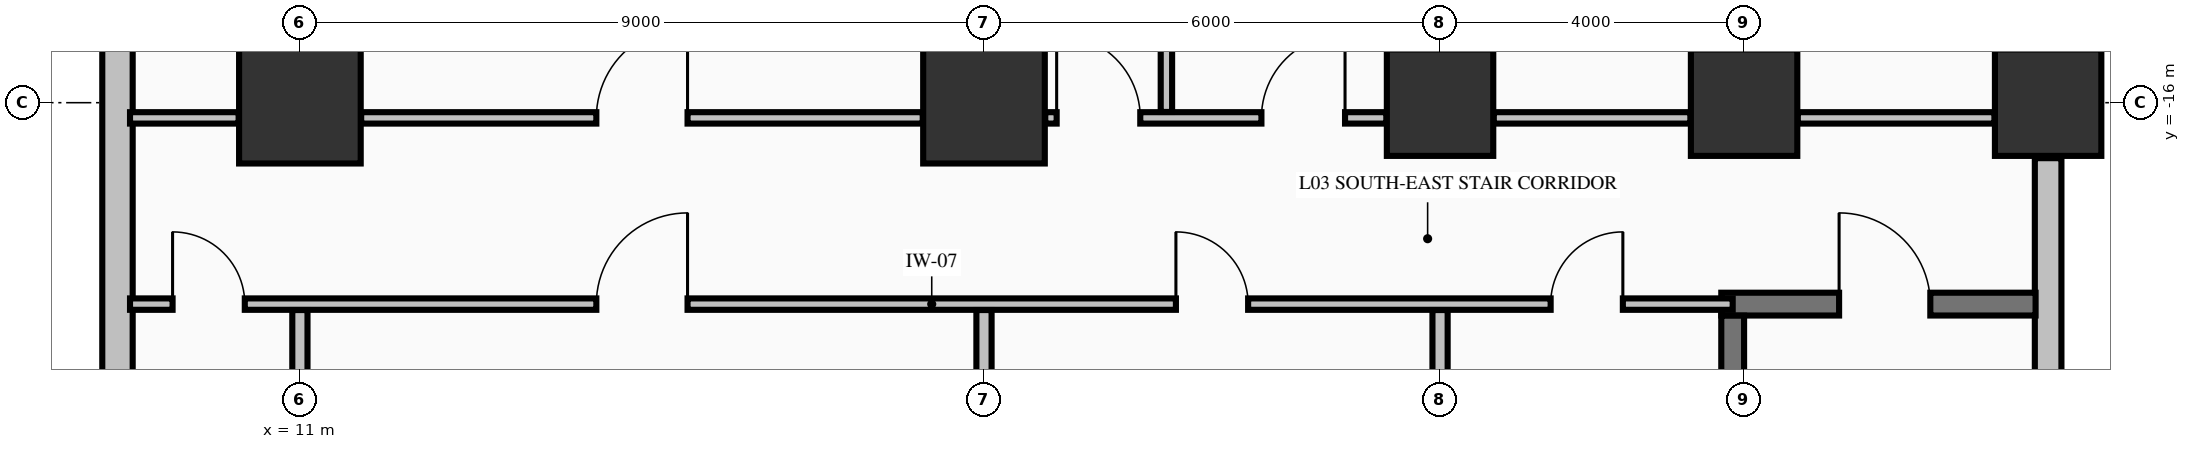
"""IFC4 building model, lengths in metres.
Left out: names, types, materials, properties, quantities, classifications, styles, units other than length and angle.
Written with IfcOpenShell. Run it as: python <this file> out.ifc"""

import sys

from ifc_helpers import new_model, si_unit, direction, frame, frame_2d, origin, origin_2d, place, context, subcontext, project, spatial, rectangle, extrude, element, fill, save


model = new_model("IFC4")
c1 = context("Model", 3, precision=1e-05, world=origin(), true_north=direction((0.0, 1.0)))
c2 = subcontext(c1, "Body", "Model", "MODEL_VIEW")
j1 = project(units=[si_unit("LENGTHUNIT", "METRE"), si_unit("PLANEANGLEUNIT", "RADIAN")], contexts=[c1])
p1 = place(None, origin())
s1 = spatial("IfcSite", under=j1, at=p1, CompositionType="ELEMENT")
p2 = place(p1, origin())
s2 = spatial("IfcBuilding", under=s1, at=p2, CompositionType="ELEMENT")
p3 = place(p2, frame((0.0, 0.0, 16.32)))
s3 = spatial("IfcBuildingStorey", under=s2, at=p3, CompositionType="ELEMENT", Elevation=16.32)
for number, where, z_axis, x_axis in (
    (1, (11.0, -16.0, 0.0), (0.0, 0.0, 1.0), (1.0, 0.0, 0.0)),
    (2, (20.0, -16.0, 0.0), (0.0, 0.0, 1.0), (1.0, 0.0, 0.0)),
):
    element("IfcColumn", number, at=place(p3, frame(where, z_axis=z_axis, x_axis=x_axis)), inside=s3, PredefinedType="COLUMN", context=c2, shape_type="SweptSolid", body=[
        extrude(rectangle(XDim=1.6, YDim=1.6, at=origin_2d()), origin(), (0.0, 0.0, 1.0), 4.99),
    ])
for number, where, z_axis, x_axis in (
    (3, (26.0, -16.0, 0.0), (0.0, 0.0, 1.0), (1.0, 0.0, 0.0)),
    (4, (30.0, -16.0, 0.0), (0.0, 0.0, 1.0), (1.0, 0.0, 0.0)),
    (5, (34.0, -16.0, 0.0), (0.0, 0.0, 1.0), (1.0, 0.0, 0.0)),
):
    element("IfcColumn", number, at=place(p3, frame(where, z_axis=z_axis, x_axis=x_axis)), inside=s3, PredefinedType="COLUMN", context=c2, shape_type="SweptSolid", body=[
        extrude(rectangle(XDim=1.4, YDim=1.4, at=origin_2d()), origin(), (0.0, 0.0, 1.0), 4.99),
    ])
p4 = place(p3, frame((34.0, -16.73, 0.0), z_axis=(0.0, 0.0, 1.0), x_axis=(0.0, -1.0, 0.0)))
e6 = element("IfcWall", 6, at=p4, inside=s3, PredefinedType="STANDARD", context=c2, shape_type="SweptSolid", body=[
    extrude(rectangle(XDim=4.54, YDim=0.35, at=frame_2d((2.27, 0.0))), origin(), (0.0, 0.0, 1.0), 4.99),
])
p5 = place(p3, frame((8.6, -0.65, 0.0), z_axis=(0.0, 0.0, 1.0), x_axis=(0.0, -1.0, 0.0)))
e7 = element("IfcWall", 7, at=p5, inside=s3, PredefinedType="STANDARD", context=c2, shape_type="SweptSolid", body=[
    extrude(rectangle(XDim=24.72, YDim=0.4, at=frame_2d((12.36, 0.0))), origin(), (0.0, 0.0, 1.0), 2.582),
])
p6 = place(p3, frame((29.7, -18.65, 0.0), z_axis=(0.0, 0.0, 1.0), x_axis=(1.0, 0.0, 0.0)))
e8 = element("IfcWall", 8, at=p6, inside=s3, PredefinedType="SHEAR", context=c2, shape_type="SweptSolid", body=[
    extrude(rectangle(XDim=4.135, YDim=0.3, at=frame_2d((2.067, 0.0))), origin(), (0.0, 0.0, 1.0), 4.99),
])
p7 = place(p6, frame((1.55, 0.0, 0.0)))
e9 = element("IfcOpeningElement", 9, at=p7, cuts=e8, PredefinedType="OPENING", context=c2, shape_type="SweptSolid", body=[
    extrude(rectangle(XDim=1.2, YDim=2.15, at=frame_2d((0.6, 1.075))), frame((0.0, 0.16, 0.0), z_axis=(0.0, -1.0, 0.0), x_axis=(1.0, 0.0, 0.0)), (0.0, 0.0, 1.0), 0.32),
])
p8 = place(p3, frame((8.765, -18.65, 0.0), z_axis=(0.0, 0.0, 1.0), x_axis=(1.0, 0.0, 0.0)))
e10 = element("IfcWall", 10, at=p8, inside=s3, PredefinedType="PARTITIONING", context=c2, shape_type="SweptSolid", body=[
    extrude(rectangle(XDim=21.085, YDim=0.15, at=frame_2d((10.542, 0.0))), origin(), (0.0, 0.0, 1.0), 4.99),
])
p9 = place(p8, frame((0.56, 0.0, 0.0)))
e11 = element("IfcOpeningElement", 11, at=p9, cuts=e10, PredefinedType="OPENING", context=c2, shape_type="SweptSolid", body=[
    extrude(rectangle(XDim=0.95, YDim=2.15, at=frame_2d((0.475, 1.075))), frame((0.0, 0.085, 0.0), z_axis=(0.0, -1.0, 0.0), x_axis=(1.0, 0.0, 0.0)), (0.0, 0.0, 1.0), 0.17),
])
p10 = place(p8, frame((6.135, 0.0, 0.0)))
e12 = element("IfcOpeningElement", 12, at=p10, cuts=e10, PredefinedType="OPENING", context=c2, shape_type="SweptSolid", body=[
    extrude(rectangle(XDim=1.2, YDim=2.15, at=frame_2d((0.6, 1.075))), frame((0.0, 0.085, 0.0), z_axis=(0.0, -1.0, 0.0), x_axis=(1.0, 0.0, 0.0)), (0.0, 0.0, 1.0), 0.17),
])
p11 = place(p8, frame((13.76, 0.0, 0.0)))
e13 = element("IfcOpeningElement", 13, at=p11, cuts=e10, PredefinedType="OPENING", context=c2, shape_type="SweptSolid", body=[
    extrude(rectangle(XDim=0.95, YDim=2.15, at=frame_2d((0.475, 1.075))), frame((0.0, 0.085, 0.0), z_axis=(0.0, -1.0, 0.0), x_axis=(1.0, 0.0, 0.0)), (0.0, 0.0, 1.0), 0.17),
])
p12 = place(p8, frame((18.69, 0.0, 0.0)))
e14 = element("IfcOpeningElement", 14, at=p12, cuts=e10, PredefinedType="OPENING", context=c2, shape_type="SweptSolid", body=[
    extrude(rectangle(XDim=0.95, YDim=2.15, at=frame_2d((0.475, 1.075))), frame((0.0, 0.085, 0.0), z_axis=(0.0, -1.0, 0.0), x_axis=(1.0, 0.0, 0.0)), (0.0, 0.0, 1.0), 0.17),
])
p13 = place(p3, frame((8.765, -16.2, 0.0), z_axis=(0.0, 0.0, 1.0), x_axis=(1.0, 0.0, 0.0)))
e15 = element("IfcWall", 15, at=p13, inside=s3, PredefinedType="PARTITIONING", context=c2, shape_type="SweptSolid", body=[
    extrude(rectangle(XDim=1.429, YDim=0.15, at=frame_2d((0.715, 0.0))), origin(), (0.0, 0.0, 1.0), 4.99),
])
p14 = place(p3, frame((11.806, -16.2, 0.0), z_axis=(0.0, 0.0, 1.0), x_axis=(1.0, 0.0, 0.0)))
e16 = element("IfcWall", 16, at=p14, inside=s3, PredefinedType="PARTITIONING", context=c2, shape_type="SweptSolid", body=[
    extrude(rectangle(XDim=7.388, YDim=0.15, at=frame_2d((3.694, 0.0))), origin(), (0.0, 0.0, 1.0), 3.332),
])
p15 = place(p14, frame((3.094, 0.0, 0.0)))
e17 = element("IfcOpeningElement", 17, at=p15, cuts=e16, PredefinedType="OPENING", context=c2, shape_type="SweptSolid", body=[
    extrude(rectangle(XDim=1.2, YDim=2.15, at=frame_2d((0.6, 1.075))), frame((0.0, 0.085, 0.0), z_axis=(0.0, -1.0, 0.0), x_axis=(1.0, 0.0, 0.0)), (0.0, 0.0, 1.0), 0.17),
])
p16 = place(p3, frame((20.806, -16.2, 0.0), z_axis=(0.0, 0.0, 1.0), x_axis=(1.0, 0.0, 0.0)))
e18 = element("IfcWall", 18, at=p16, inside=s3, PredefinedType="PARTITIONING", context=c2, shape_type="SweptSolid", body=[
    extrude(rectangle(XDim=4.488, YDim=0.15, at=frame_2d((2.244, 0.0))), origin(), (0.0, 0.0, 1.0), 3.332),
])
p17 = place(p16, frame((0.15, 0.0, 0.0)))
e19 = element("IfcOpeningElement", 19, at=p17, cuts=e18, PredefinedType="OPENING", context=c2, shape_type="SweptSolid", body=[
    extrude(rectangle(XDim=1.1, YDim=2.15, at=frame_2d((0.55, 1.075))), frame((0.0, 0.085, 0.0), z_axis=(0.0, -1.0, 0.0), x_axis=(1.0, 0.0, 0.0)), (0.0, 0.0, 1.0), 0.17),
])
p18 = place(p16, frame((2.844, 0.0, 0.0)))
e20 = element("IfcOpeningElement", 20, at=p18, cuts=e18, PredefinedType="OPENING", context=c2, shape_type="SweptSolid", body=[
    extrude(rectangle(XDim=1.1, YDim=2.15, at=frame_2d((0.55, 1.075))), frame((0.0, 0.085, 0.0), z_axis=(0.0, -1.0, 0.0), x_axis=(1.0, 0.0, 0.0)), (0.0, 0.0, 1.0), 0.17),
])
for number, where, z_axis, x_axis in (
    (21, (26.706, -16.2, 0.0), (0.0, 0.0, 1.0), (1.0, 0.0, 0.0)),
    (22, (30.706, -16.2, 0.0), (0.0, 0.0, 1.0), (1.0, 0.0, 0.0)),
):
    element("IfcWall", number, at=place(p3, frame(where, z_axis=z_axis, x_axis=x_axis)), inside=s3, PredefinedType="PARTITIONING", context=c2, shape_type="SweptSolid", body=[
        extrude(rectangle(XDim=2.588, YDim=0.15, at=frame_2d((1.294, 0.0))), origin(), (0.0, 0.0, 1.0), 3.332),
    ])
p19 = place(p3, frame((29.85, -28.296, 0.0), z_axis=(0.0, 0.0, 1.0), x_axis=(0.0, 1.0, 0.0)))
e23 = element("IfcWall", 23, at=p19, inside=s3, PredefinedType="SHEAR", context=c2, shape_type="SweptSolid", body=[
    extrude(rectangle(XDim=9.494, YDim=0.3, at=frame_2d((4.747, 0.0))), origin(), (0.0, 0.0, 1.0), 4.99),
])
for number, where, z_axis, x_axis in (
    (24, (11.0, -21.194, 0.0), (0.0, 0.0, 1.0), (0.0, 1.0, 0.0)),
    (25, (20.0, -21.194, 0.0), (0.0, 0.0, 1.0), (0.0, 1.0, 0.0)),
):
    element("IfcWall", number, at=place(p3, frame(where, z_axis=z_axis, x_axis=x_axis)), inside=s3, PredefinedType="PARTITIONING", context=c2, shape_type="SweptSolid", body=[
        extrude(rectangle(XDim=2.466, YDim=0.2, at=frame_2d((1.233, 0.0))), origin(), (0.0, 0.0, 1.0), 3.332),
    ])
p20 = place(p3, frame((22.4, -16.122, 0.0), z_axis=(0.0, 0.0, 1.0), x_axis=(0.0, 1.0, 0.0)))
e26 = element("IfcWall", 26, at=p20, inside=s3, PredefinedType="PARTITIONING", context=c2, shape_type="SweptSolid", body=[
    extrude(rectangle(XDim=32.044, YDim=0.15, at=frame_2d((16.022, 0.0))), origin(), (0.0, 0.0, 1.0), 4.99),
])
p21 = place(p20, frame((10.522, 0.0, 0.0)))
e27 = element("IfcOpeningElement", 27, at=p21, cuts=e26, PredefinedType="OPENING", context=c2, shape_type="SweptSolid", body=[
    extrude(rectangle(XDim=1.2, YDim=2.15, at=frame_2d((0.6, 1.075))), frame((0.0, 0.085, 0.0), z_axis=(0.0, -1.0, 0.0), x_axis=(1.0, 0.0, 0.0)), (0.0, 0.0, 1.0), 0.17),
])
p22 = place(p20, frame((20.522, 0.0, 0.0)))
e28 = element("IfcOpeningElement", 28, at=p22, cuts=e26, PredefinedType="OPENING", context=c2, shape_type="SweptSolid", body=[
    extrude(rectangle(XDim=1.2, YDim=2.15, at=frame_2d((0.6, 1.075))), frame((0.0, 0.085, 0.0), z_axis=(0.0, -1.0, 0.0), x_axis=(1.0, 0.0, 0.0)), (0.0, 0.0, 1.0), 0.17),
])
p23 = place(p3, frame((26.0, -21.294, 0.0), z_axis=(0.0, 0.0, 1.0), x_axis=(0.0, 1.0, 0.0)))
e29 = element("IfcWall", 29, at=p23, inside=s3, PredefinedType="PARTITIONING", context=c2, shape_type="SweptSolid", body=[
    extrude(rectangle(XDim=2.566, YDim=0.2, at=frame_2d((1.283, 0.0))), origin(), (0.0, 0.0, 1.0), 3.332),
])
p24 = place(p7, origin())
e30 = element("IfcDoor", 30, at=p24, inside=s3, OperationType="SINGLE_SWING_LEFT", PredefinedType="DOOR", context=c2, shape_type="SweptSolid", body=[
    extrude(rectangle(XDim=1.2, YDim=2.15, at=frame_2d((0.6, 1.075))), frame((0.0, 0.025, 0.0), z_axis=(0.0, -1.0, 0.0), x_axis=(1.0, 0.0, 0.0)), (0.0, 0.0, 1.0), 0.05),
])
fill(e9, e30)
p25 = place(p15, origin())
e31 = element("IfcDoor", 31, at=p25, inside=s3, OperationType="SINGLE_SWING_RIGHT", PredefinedType="DOOR", context=c2, shape_type="SweptSolid", body=[
    extrude(rectangle(XDim=1.2, YDim=2.15, at=frame_2d((0.6, 1.075))), frame((0.0, 0.025, 0.0), z_axis=(0.0, -1.0, 0.0), x_axis=(1.0, 0.0, 0.0)), (0.0, 0.0, 1.0), 0.05),
])
fill(e17, e31)
p26 = place(p17, origin())
e32 = element("IfcDoor", 32, at=p26, inside=s3, OperationType="SINGLE_SWING_LEFT", PredefinedType="DOOR", context=c2, shape_type="SweptSolid", body=[
    extrude(rectangle(XDim=1.1, YDim=2.15, at=frame_2d((0.55, 1.075))), frame((0.0, 0.025, 0.0), z_axis=(0.0, -1.0, 0.0), x_axis=(1.0, 0.0, 0.0)), (0.0, 0.0, 1.0), 0.05),
])
fill(e19, e32)
p27 = place(p18, origin())
e33 = element("IfcDoor", 33, at=p27, inside=s3, OperationType="SINGLE_SWING_RIGHT", PredefinedType="DOOR", context=c2, shape_type="SweptSolid", body=[
    extrude(rectangle(XDim=1.1, YDim=2.15, at=frame_2d((0.55, 1.075))), frame((0.0, 0.025, 0.0), z_axis=(0.0, -1.0, 0.0), x_axis=(1.0, 0.0, 0.0)), (0.0, 0.0, 1.0), 0.05),
])
fill(e20, e33)
p28 = place(p9, origin())
e34 = element("IfcDoor", 34, at=p28, inside=s3, OperationType="SINGLE_SWING_LEFT", PredefinedType="DOOR", context=c2, shape_type="SweptSolid", body=[
    extrude(rectangle(XDim=0.95, YDim=2.15, at=frame_2d((0.475, 1.075))), frame((0.0, 0.025, 0.0), z_axis=(0.0, -1.0, 0.0), x_axis=(1.0, 0.0, 0.0)), (0.0, 0.0, 1.0), 0.05),
])
fill(e11, e34)
p29 = place(p10, origin())
e35 = element("IfcDoor", 35, at=p29, inside=s3, OperationType="SINGLE_SWING_RIGHT", PredefinedType="DOOR", context=c2, shape_type="SweptSolid", body=[
    extrude(rectangle(XDim=1.2, YDim=2.15, at=frame_2d((0.6, 1.075))), frame((0.0, 0.025, 0.0), z_axis=(0.0, -1.0, 0.0), x_axis=(1.0, 0.0, 0.0)), (0.0, 0.0, 1.0), 0.05),
])
fill(e12, e35)
p30 = place(p11, origin())
e36 = element("IfcDoor", 36, at=p30, inside=s3, OperationType="SINGLE_SWING_LEFT", PredefinedType="DOOR", context=c2, shape_type="SweptSolid", body=[
    extrude(rectangle(XDim=0.95, YDim=2.15, at=frame_2d((0.475, 1.075))), frame((0.0, 0.025, 0.0), z_axis=(0.0, -1.0, 0.0), x_axis=(1.0, 0.0, 0.0)), (0.0, 0.0, 1.0), 0.05),
])
fill(e13, e36)
p31 = place(p12, origin())
e37 = element("IfcDoor", 37, at=p31, inside=s3, OperationType="SINGLE_SWING_RIGHT", PredefinedType="DOOR", context=c2, shape_type="SweptSolid", body=[
    extrude(rectangle(XDim=0.95, YDim=2.15, at=frame_2d((0.475, 1.075))), frame((0.0, 0.025, 0.0), z_axis=(0.0, -1.0, 0.0), x_axis=(1.0, 0.0, 0.0)), (0.0, 0.0, 1.0), 0.05),
])
fill(e14, e37)
save(model, sys.argv[1])
